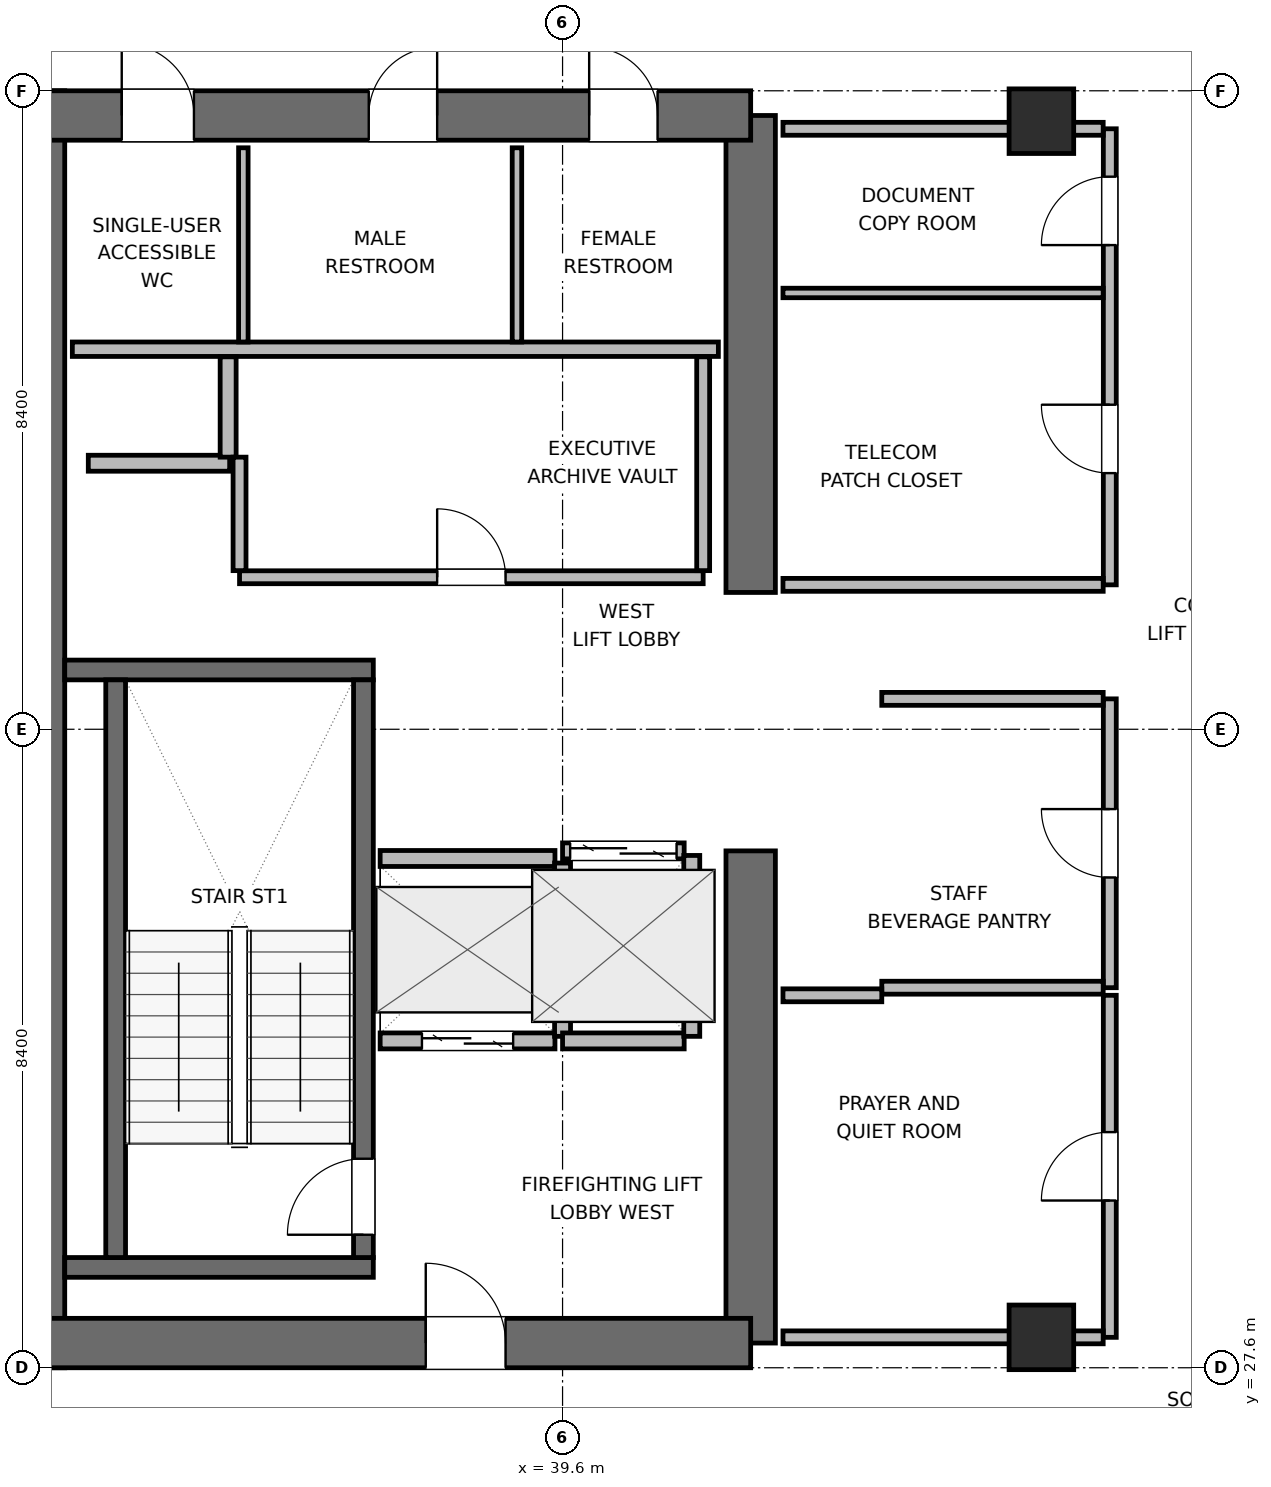
"""IFC4 building model, lengths in metres.
Left out: names, types, materials, properties, quantities, classifications, styles, units other than length and angle.
Written with IfcOpenShell. Run it as: python <this file> out.ifc"""

import sys

from ifc_helpers import new_model, si_unit, direction, frame, frame_2d, origin, origin_2d, place, context, subcontext, project, spatial, rectangle, extrude, element, fill, save


model = new_model("IFC4")
c1 = context("Model", 3, precision=1e-05, world=origin(), true_north=direction((0.0, 1.0)))
c2 = subcontext(c1, "Body", "Model", "MODEL_VIEW")
j1 = project(units=[si_unit("LENGTHUNIT", "METRE"), si_unit("PLANEANGLEUNIT", "RADIAN")], contexts=[c1])
p1 = place(None, origin())
s1 = spatial("IfcSite", under=j1, at=p1, CompositionType="ELEMENT")
p2 = place(p1, origin())
s2 = spatial("IfcBuilding", under=s1, at=p2, CompositionType="ELEMENT")
p3 = place(p2, frame((0.0, 0.0, 258.9)))
s3 = spatial("IfcBuildingStorey", under=s2, at=p3, CompositionType="ELEMENT", Elevation=258.9)
p4 = place(p3, frame((32.725, 27.6, 0.0), z_axis=(0.0, 0.0, 1.0), x_axis=(0.0, 1.0, 0.0)))
e1 = element("IfcWall", 1, at=p4, inside=s3, PredefinedType="SHEAR", context=c2, shape_type="SweptSolid", body=[
    extrude(rectangle(XDim=16.8, YDim=0.65, at=frame_2d((8.4, 0.0))), origin(), (0.0, 0.0, 1.0), 3.9),
])
p5 = place(p3, frame((42.075, 27.925, 0.0), z_axis=(0.0, 0.0, 1.0), x_axis=(0.0, 1.0, 0.0)))
e2 = element("IfcWall", 2, at=p5, inside=s3, PredefinedType="SHEAR", context=c2, shape_type="SweptSolid", body=[
    extrude(rectangle(XDim=6.475, YDim=0.65, at=frame_2d((3.237, 0.0))), origin(), (0.0, 0.0, 1.0), 3.9),
])
p6 = place(p3, frame((42.075, 37.8, 0.0), z_axis=(0.0, 0.0, 1.0), x_axis=(0.0, 1.0, 0.0)))
e3 = element("IfcWall", 3, at=p6, inside=s3, PredefinedType="SHEAR", context=c2, shape_type="SweptSolid", body=[
    extrude(rectangle(XDim=6.275, YDim=0.65, at=frame_2d((3.137, 0.0))), origin(), (0.0, 0.0, 1.0), 3.9),
])
p7 = place(p3, frame((32.725, 27.925, 0.0), z_axis=(0.0, 0.0, 1.0), x_axis=(1.0, 0.0, 0.0)))
e4 = element("IfcWall", 4, at=p7, inside=s3, PredefinedType="SHEAR", context=c2, shape_type="SweptSolid", body=[
    extrude(rectangle(XDim=9.35, YDim=0.65, at=frame_2d((4.675, 0.0))), origin(), (0.0, 0.0, 1.0), 3.9),
])
p8 = place(p7, frame((5.075, 0.0, 0.0)))
e5 = element("IfcOpeningElement", 5, at=p8, cuts=e4, PredefinedType="OPENING", context=c2, shape_type="SweptSolid", body=[
    extrude(rectangle(XDim=1.05, YDim=2.04, at=frame_2d((0.525, 1.02))), frame((0.0, 0.335, 0.0), z_axis=(0.0, -1.0, 0.0), x_axis=(1.0, 0.0, 0.0)), (0.0, 0.0, 1.0), 0.67),
])
p9 = place(p3, frame((32.725, 44.075, 0.0), z_axis=(0.0, 0.0, 1.0), x_axis=(1.0, 0.0, 0.0)))
e6 = element("IfcWall", 6, at=p9, inside=s3, PredefinedType="SHEAR", context=c2, shape_type="SweptSolid", body=[
    extrude(rectangle(XDim=9.35, YDim=0.65, at=frame_2d((4.675, 0.0))), origin(), (0.0, 0.0, 1.0), 3.9),
])
p10 = place(p9, frame((1.075, 0.0, 0.0)))
e7 = element("IfcOpeningElement", 7, at=p10, cuts=e6, PredefinedType="OPENING", context=c2, shape_type="SweptSolid", body=[
    extrude(rectangle(XDim=0.95, YDim=2.04, at=frame_2d((0.475, 1.02))), frame((0.0, 0.335, 0.0), z_axis=(0.0, -1.0, 0.0), x_axis=(1.0, 0.0, 0.0)), (0.0, 0.0, 1.0), 0.67),
])
p11 = place(p9, frame((4.325, 0.0, 0.0)))
e8 = element("IfcOpeningElement", 8, at=p11, cuts=e6, PredefinedType="OPENING", context=c2, shape_type="SweptSolid", body=[
    extrude(rectangle(XDim=0.9, YDim=2.02, at=frame_2d((0.45, 1.01))), frame((0.0, 0.335, 0.0), z_axis=(0.0, -1.0, 0.0), x_axis=(1.0, 0.0, 0.0)), (0.0, 0.0, 1.0), 0.67),
])
p12 = place(p9, frame((7.225, 0.0, 0.0)))
e9 = element("IfcOpeningElement", 9, at=p12, cuts=e6, PredefinedType="OPENING", context=c2, shape_type="SweptSolid", body=[
    extrude(rectangle(XDim=0.9, YDim=2.02, at=frame_2d((0.45, 1.01))), frame((0.0, 0.335, 0.0), z_axis=(0.0, -1.0, 0.0), x_axis=(1.0, 0.0, 0.0)), (0.0, 0.0, 1.0), 0.67),
])
for number, where, z_axis, x_axis in (
    (10, (33.05, 28.92, 0.0), (0.0, 0.0, 1.0), (1.0, 0.0, 0.0)),
    (11, (33.05, 36.78, 0.0), (0.0, 0.0, 1.0), (1.0, 0.0, 0.0)),
):
    element("IfcWall", number, at=place(p3, frame(where, z_axis=z_axis, x_axis=x_axis)), inside=s3, PredefinedType="SHEAR", context=c2, shape_type="SweptSolid", body=[
        extrude(rectangle(XDim=4.06, YDim=0.26, at=frame_2d((2.03, 0.0))), origin(), (0.0, 0.0, 1.0), 3.9),
    ])
p13 = place(p3, frame((33.72, 29.05, 0.0), z_axis=(0.0, 0.0, 1.0), x_axis=(0.0, 1.0, 0.0)))
e12 = element("IfcWall", 12, at=p13, inside=s3, PredefinedType="SHEAR", context=c2, shape_type="SweptSolid", body=[
    extrude(rectangle(XDim=7.6, YDim=0.26, at=frame_2d((3.8, 0.0))), origin(), (0.0, 0.0, 1.0), 3.9),
])
p14 = place(p3, frame((36.98, 29.05, 0.0), z_axis=(0.0, 0.0, 1.0), x_axis=(0.0, 1.0, 0.0)))
e13 = element("IfcWall", 13, at=p14, inside=s3, PredefinedType="SHEAR", context=c2, shape_type="SweptSolid", body=[
    extrude(rectangle(XDim=7.6, YDim=0.26, at=frame_2d((3.8, 0.0))), origin(), (0.0, 0.0, 1.0), 3.9),
])
p15 = place(p14, frame((0.3, 0.0, 0.0)))
e14 = element("IfcOpeningElement", 14, at=p15, cuts=e13, PredefinedType="OPENING", context=c2, shape_type="SweptSolid", body=[
    extrude(rectangle(XDim=1.0, YDim=2.04, at=frame_2d((0.5, 1.02))), frame((0.0, 0.14, 0.0), z_axis=(0.0, -1.0, 0.0), x_axis=(1.0, 0.0, 0.0)), (0.0, 0.0, 1.0), 0.28),
])
for number, where, z_axis, x_axis in (
    (15, (45.9, 28.0, 0.0), (0.0, 0.0, 1.0), (1.0, 0.0, 0.0)),
    (16, (45.9, 44.0, 0.0), (0.0, 0.0, 1.0), (1.0, 0.0, 0.0)),
):
    element("IfcColumn", number, at=place(p3, frame(where, z_axis=z_axis, x_axis=x_axis)), inside=s3, PredefinedType="COLUMN", context=c2, shape_type="SweptSolid", body=[
        extrude(rectangle(XDim=0.85, YDim=0.85, at=origin_2d()), origin(), (0.0, 0.0, 1.0), 3.9),
    ])
p16 = place(p3, frame((33.15, 41.0, 0.0), z_axis=(0.0, 0.0, 1.0), x_axis=(1.0, 0.0, 0.0)))
e17 = element("IfcWall", 17, at=p16, inside=s3, PredefinedType="PLUMBINGWALL", context=c2, shape_type="SweptSolid", body=[
    extrude(rectangle(XDim=8.5, YDim=0.19, at=frame_2d((4.25, 0.0))), origin(), (0.0, 0.0, 1.0), 3.68),
])
for number, where, z_axis, x_axis in (
    (18, (35.4, 41.095, 0.0), (0.0, 0.0, 1.0), (0.0, 1.0, 0.0)),
    (19, (39.0, 41.095, 0.0), (0.0, 0.0, 1.0), (0.0, 1.0, 0.0)),
):
    element("IfcWall", number, at=place(p3, frame(where, z_axis=z_axis, x_axis=x_axis)), inside=s3, PredefinedType="PARTITIONING", context=c2, shape_type="SweptSolid", body=[
        extrude(rectangle(XDim=2.555, YDim=0.125, at=frame_2d((1.277, 0.0))), origin(), (0.0, 0.0, 1.0), 3.68),
    ])
p17 = place(p3, frame((33.36, 39.5, 0.0), z_axis=(0.0, 0.0, 1.0), x_axis=(1.0, 0.0, 0.0)))
e20 = element("IfcWall", 20, at=p17, inside=s3, PredefinedType="PARTITIONING", context=c2, shape_type="SweptSolid", body=[
    extrude(rectangle(XDim=1.86, YDim=0.21, at=frame_2d((0.93, 0.0))), origin(), (0.0, 0.0, 1.0), 3.68),
])
p18 = place(p3, frame((35.2, 39.58, 0.0), z_axis=(0.0, 0.0, 1.0), x_axis=(0.0, 1.0, 0.0)))
e21 = element("IfcWall", 21, at=p18, inside=s3, PredefinedType="PARTITIONING", context=c2, shape_type="SweptSolid", body=[
    extrude(rectangle(XDim=1.32, YDim=0.21, at=frame_2d((0.66, 0.0))), origin(), (0.0, 0.0, 1.0), 3.68),
])
p19 = place(p3, frame((37.2, 31.9, 0.0), z_axis=(0.0, 0.0, 1.0), x_axis=(1.0, 0.0, 0.0)))
e22 = element("IfcWall", 22, at=p19, inside=s3, PredefinedType="PARTITIONING", context=c2, shape_type="SweptSolid", body=[
    extrude(rectangle(XDim=2.3, YDim=0.21, at=frame_2d((1.15, 0.0))), origin(), (0.0, 0.0, 1.0), 3.68),
])
p20 = place(p19, frame((0.55, 0.0, 0.0)))
e23 = element("IfcOpeningElement", 23, at=p20, cuts=e22, PredefinedType="OPENING", context=c2, shape_type="SweptSolid", body=[
    extrude(rectangle(XDim=1.2, YDim=2.04, at=frame_2d((0.6, 1.02))), frame((0.0, 0.115, 0.0), z_axis=(0.0, -1.0, 0.0), x_axis=(1.0, 0.0, 0.0)), (0.0, 0.0, 1.0), 0.23),
])
p21 = place(p3, frame((37.2, 34.3, 0.0), z_axis=(0.0, 0.0, 1.0), x_axis=(1.0, 0.0, 0.0)))
e24 = element("IfcWall", 24, at=p21, inside=s3, PredefinedType="PARTITIONING", context=c2, shape_type="SweptSolid", body=[
    extrude(rectangle(XDim=2.3, YDim=0.21, at=frame_2d((1.15, 0.0))), origin(), (0.0, 0.0, 1.0), 3.68),
])
p22 = place(p3, frame((39.6, 31.96, 0.0), z_axis=(0.0, 0.0, 1.0), x_axis=(0.0, 1.0, 0.0)))
e25 = element("IfcWall", 25, at=p22, inside=s3, PredefinedType="PARTITIONING", context=c2, shape_type="SweptSolid", body=[
    extrude(rectangle(XDim=2.28, YDim=0.21, at=frame_2d((1.14, 0.0))), origin(), (0.0, 0.0, 1.0), 3.68),
])
p23 = place(p3, frame((39.6, 34.4, 0.0), z_axis=(0.0, 0.0, 1.0), x_axis=(1.0, 0.0, 0.0)))
e26 = element("IfcWall", 26, at=p23, inside=s3, PredefinedType="PARTITIONING", context=c2, shape_type="SweptSolid", body=[
    extrude(rectangle(XDim=1.6, YDim=0.21, at=frame_2d((0.8, 0.0))), origin(), (0.0, 0.0, 1.0), 3.68),
])
p24 = place(p23, frame((0.1, 0.0, 0.0)))
e27 = element("IfcOpeningElement", 27, at=p24, cuts=e26, PredefinedType="OPENING", context=c2, shape_type="SweptSolid", body=[
    extrude(rectangle(XDim=1.4, YDim=2.06, at=frame_2d((0.7, 1.03))), frame((0.0, 0.115, 0.0), z_axis=(0.0, -1.0, 0.0), x_axis=(1.0, 0.0, 0.0)), (0.0, 0.0, 1.0), 0.23),
])
p25 = place(p3, frame((39.6, 31.9, 0.0), z_axis=(0.0, 0.0, 1.0), x_axis=(1.0, 0.0, 0.0)))
e28 = element("IfcWall", 28, at=p25, inside=s3, PredefinedType="PARTITIONING", context=c2, shape_type="SweptSolid", body=[
    extrude(rectangle(XDim=1.6, YDim=0.21, at=frame_2d((0.8, 0.0))), origin(), (0.0, 0.0, 1.0), 3.68),
])
p26 = place(p3, frame((41.3, 31.96, 0.0), z_axis=(0.0, 0.0, 1.0), x_axis=(0.0, 1.0, 0.0)))
e29 = element("IfcWall", 29, at=p26, inside=s3, PredefinedType="PARTITIONING", context=c2, shape_type="SweptSolid", body=[
    extrude(rectangle(XDim=2.38, YDim=0.21, at=frame_2d((1.19, 0.0))), origin(), (0.0, 0.0, 1.0), 3.68),
])
p27 = place(p3, frame((35.35, 38.0, 0.0), z_axis=(0.0, 0.0, 1.0), x_axis=(1.0, 0.0, 0.0)))
e30 = element("IfcWall", 30, at=p27, inside=s3, PredefinedType="PARTITIONING", context=c2, shape_type="SweptSolid", body=[
    extrude(rectangle(XDim=6.1, YDim=0.17, at=frame_2d((3.05, 0.0))), origin(), (0.0, 0.0, 1.0), 3.68),
])
p28 = place(p27, frame((2.6, 0.0, 0.0)))
e31 = element("IfcOpeningElement", 31, at=p28, cuts=e30, PredefinedType="OPENING", context=c2, shape_type="SweptSolid", body=[
    extrude(rectangle(XDim=0.9, YDim=2.02, at=frame_2d((0.45, 1.01))), frame((0.0, 0.095, 0.0), z_axis=(0.0, -1.0, 0.0), x_axis=(1.0, 0.0, 0.0)), (0.0, 0.0, 1.0), 0.19),
])
p29 = place(p3, frame((35.35, 38.087, 0.0), z_axis=(0.0, 0.0, 1.0), x_axis=(0.0, 1.0, 0.0)))
e32 = element("IfcWall", 32, at=p29, inside=s3, PredefinedType="PARTITIONING", context=c2, shape_type="SweptSolid", body=[
    extrude(rectangle(XDim=1.493, YDim=0.17, at=frame_2d((0.747, 0.0))), origin(), (0.0, 0.0, 1.0), 3.68),
])
p30 = place(p3, frame((41.45, 38.087, 0.0), z_axis=(0.0, 0.0, 1.0), x_axis=(0.0, 1.0, 0.0)))
e33 = element("IfcWall", 33, at=p30, inside=s3, PredefinedType="PARTITIONING", context=c2, shape_type="SweptSolid", body=[
    extrude(rectangle(XDim=2.813, YDim=0.17, at=frame_2d((1.406, 0.0))), origin(), (0.0, 0.0, 1.0), 3.68),
])
p31 = place(p3, frame((46.8, 32.6, 0.0), z_axis=(0.0, 0.0, 1.0), x_axis=(0.0, 1.0, 0.0)))
e34 = element("IfcWall", 34, at=p31, inside=s3, PredefinedType="PARTITIONING", context=c2, shape_type="SweptSolid", body=[
    extrude(rectangle(XDim=3.8, YDim=0.17, at=frame_2d((1.9, 0.0))), origin(), (0.0, 0.0, 1.0), 3.68),
])
p32 = place(p31, frame((1.45, 0.0, 0.0)))
e35 = element("IfcOpeningElement", 35, at=p32, cuts=e34, PredefinedType="OPENING", context=c2, shape_type="SweptSolid", body=[
    extrude(rectangle(XDim=0.9, YDim=2.02, at=frame_2d((0.45, 1.01))), frame((0.0, 0.095, 0.0), z_axis=(0.0, -1.0, 0.0), x_axis=(1.0, 0.0, 0.0)), (0.0, 0.0, 1.0), 0.19),
])
for number, where, z_axis, x_axis in (
    (36, (43.8, 32.6, 0.0), (0.0, 0.0, 1.0), (1.0, 0.0, 0.0)),
    (37, (43.8, 36.4, 0.0), (0.0, 0.0, 1.0), (1.0, 0.0, 0.0)),
):
    element("IfcWall", number, at=place(p3, frame(where, z_axis=z_axis, x_axis=x_axis)), inside=s3, PredefinedType="PARTITIONING", context=c2, shape_type="SweptSolid", body=[
        extrude(rectangle(XDim=2.913, YDim=0.17, at=frame_2d((1.457, 0.0))), origin(), (0.0, 0.0, 1.0), 3.68),
    ])
p33 = place(p3, frame((46.8, 28.0, 0.0), z_axis=(0.0, 0.0, 1.0), x_axis=(0.0, 1.0, 0.0)))
e38 = element("IfcWall", 38, at=p33, inside=s3, PredefinedType="PARTITIONING", context=c2, shape_type="SweptSolid", body=[
    extrude(rectangle(XDim=4.5, YDim=0.17, at=frame_2d((2.25, 0.0))), origin(), (0.0, 0.0, 1.0), 3.68),
])
p34 = place(p33, frame((1.8, 0.0, 0.0)))
e39 = element("IfcOpeningElement", 39, at=p34, cuts=e38, PredefinedType="OPENING", context=c2, shape_type="SweptSolid", body=[
    extrude(rectangle(XDim=0.9, YDim=2.02, at=frame_2d((0.45, 1.01))), frame((0.0, 0.095, 0.0), z_axis=(0.0, -1.0, 0.0), x_axis=(1.0, 0.0, 0.0)), (0.0, 0.0, 1.0), 0.19),
])
p35 = place(p3, frame((42.5, 28.0, 0.0), z_axis=(0.0, 0.0, 1.0), x_axis=(1.0, 0.0, 0.0)))
e40 = element("IfcWall", 40, at=p35, inside=s3, PredefinedType="PARTITIONING", context=c2, shape_type="SweptSolid", body=[
    extrude(rectangle(XDim=4.213, YDim=0.17, at=frame_2d((2.106, 0.0))), origin(), (0.0, 0.0, 1.0), 2.765),
])
p36 = place(p3, frame((42.5, 32.5, 0.0), z_axis=(0.0, 0.0, 1.0), x_axis=(1.0, 0.0, 0.0)))
e41 = element("IfcWall", 41, at=p36, inside=s3, PredefinedType="PARTITIONING", context=c2, shape_type="SweptSolid", body=[
    extrude(rectangle(XDim=1.3, YDim=0.17, at=frame_2d((0.65, 0.0))), origin(), (0.0, 0.0, 1.0), 3.68),
])
p37 = place(p3, frame((46.8, 37.9, 0.0), z_axis=(0.0, 0.0, 1.0), x_axis=(0.0, 1.0, 0.0)))
e42 = element("IfcWall", 42, at=p37, inside=s3, PredefinedType="PARTITIONING", context=c2, shape_type="SweptSolid", body=[
    extrude(rectangle(XDim=6.0, YDim=0.17, at=frame_2d((3.0, 0.0))), origin(), (0.0, 0.0, 1.0), 3.68),
])
p38 = place(p37, frame((1.47, 0.0, 0.0)))
e43 = element("IfcOpeningElement", 43, at=p38, cuts=e42, PredefinedType="OPENING", context=c2, shape_type="SweptSolid", body=[
    extrude(rectangle(XDim=0.9, YDim=2.02, at=frame_2d((0.45, 1.01))), frame((0.0, 0.095, 0.0), z_axis=(0.0, -1.0, 0.0), x_axis=(1.0, 0.0, 0.0)), (0.0, 0.0, 1.0), 0.19),
])
p39 = place(p37, frame((4.47, 0.0, 0.0)))
e44 = element("IfcOpeningElement", 44, at=p39, cuts=e42, PredefinedType="OPENING", context=c2, shape_type="SweptSolid", body=[
    extrude(rectangle(XDim=0.9, YDim=2.02, at=frame_2d((0.45, 1.01))), frame((0.0, 0.095, 0.0), z_axis=(0.0, -1.0, 0.0), x_axis=(1.0, 0.0, 0.0)), (0.0, 0.0, 1.0), 0.19),
])
p40 = place(p3, frame((42.5, 37.9, 0.0), z_axis=(0.0, 0.0, 1.0), x_axis=(1.0, 0.0, 0.0)))
e45 = element("IfcWall", 45, at=p40, inside=s3, PredefinedType="PARTITIONING", context=c2, shape_type="SweptSolid", body=[
    extrude(rectangle(XDim=4.213, YDim=0.17, at=frame_2d((2.106, 0.0))), origin(), (0.0, 0.0, 1.0), 3.68),
])
p41 = place(p3, frame((42.5, 43.9, 0.0), z_axis=(0.0, 0.0, 1.0), x_axis=(1.0, 0.0, 0.0)))
e46 = element("IfcWall", 46, at=p41, inside=s3, PredefinedType="PARTITIONING", context=c2, shape_type="SweptSolid", body=[
    extrude(rectangle(XDim=4.213, YDim=0.17, at=frame_2d((2.106, 0.0))), origin(), (0.0, 0.0, 1.0), 2.765),
])
p42 = place(p3, frame((42.5, 41.74, 0.0), z_axis=(0.0, 0.0, 1.0), x_axis=(1.0, 0.0, 0.0)))
e47 = element("IfcWall", 47, at=p42, inside=s3, PredefinedType="PARTITIONING", context=c2, shape_type="SweptSolid", body=[
    extrude(rectangle(XDim=4.213, YDim=0.125, at=frame_2d((2.106, 0.0))), origin(), (0.0, 0.0, 1.0), 3.68),
])
p43 = place(p15, origin())
e48 = element("IfcDoor", 48, at=p43, inside=s3, OperationType="SINGLE_SWING_LEFT", PredefinedType="DOOR", context=c2, shape_type="SweptSolid", body=[
    extrude(rectangle(XDim=1.0, YDim=2.04, at=frame_2d((0.5, 1.02))), frame((0.0, 0.025, 0.0), z_axis=(0.0, -1.0, 0.0), x_axis=(1.0, 0.0, 0.0)), (0.0, 0.0, 1.0), 0.05),
])
fill(e14, e48)
p44 = place(p20, origin())
e49 = element("IfcDoor", 49, at=p44, inside=s3, OperationType="DOUBLE_DOOR_SLIDING", PredefinedType="DOOR", context=c2, shape_type="SweptSolid", body=[
    extrude(rectangle(XDim=1.2, YDim=2.04, at=frame_2d((0.6, 1.02))), frame((0.0, 0.025, 0.0), z_axis=(0.0, -1.0, 0.0), x_axis=(1.0, 0.0, 0.0)), (0.0, 0.0, 1.0), 0.05),
])
fill(e23, e49)
p45 = place(p24, origin())
e50 = element("IfcDoor", 50, at=p45, inside=s3, OperationType="DOUBLE_DOOR_SLIDING", PredefinedType="DOOR", context=c2, shape_type="SweptSolid", body=[
    extrude(rectangle(XDim=1.4, YDim=2.06, at=frame_2d((0.7, 1.03))), frame((0.0, 0.025, 0.0), z_axis=(0.0, -1.0, 0.0), x_axis=(1.0, 0.0, 0.0)), (0.0, 0.0, 1.0), 0.05),
])
fill(e27, e50)
p46 = place(p8, origin())
e51 = element("IfcDoor", 51, at=p46, inside=s3, OperationType="SINGLE_SWING_LEFT", PredefinedType="DOOR", context=c2, shape_type="SweptSolid", body=[
    extrude(rectangle(XDim=1.05, YDim=2.04, at=frame_2d((0.525, 1.02))), frame((0.0, 0.025, 0.0), z_axis=(0.0, -1.0, 0.0), x_axis=(1.0, 0.0, 0.0)), (0.0, 0.0, 1.0), 0.05),
])
fill(e5, e51)
p47 = place(p10, origin())
e52 = element("IfcDoor", 52, at=p47, inside=s3, OperationType="SINGLE_SWING_LEFT", PredefinedType="DOOR", context=c2, shape_type="SweptSolid", body=[
    extrude(rectangle(XDim=0.95, YDim=2.04, at=frame_2d((0.475, 1.02))), frame((0.0, 0.025, 0.0), z_axis=(0.0, -1.0, 0.0), x_axis=(1.0, 0.0, 0.0)), (0.0, 0.0, 1.0), 0.05),
])
fill(e7, e52)
p48 = place(p11, origin())
e53 = element("IfcDoor", 53, at=p48, inside=s3, OperationType="SINGLE_SWING_RIGHT", PredefinedType="DOOR", context=c2, shape_type="SweptSolid", body=[
    extrude(rectangle(XDim=0.9, YDim=2.02, at=frame_2d((0.45, 1.01))), frame((0.0, 0.025, 0.0), z_axis=(0.0, -1.0, 0.0), x_axis=(1.0, 0.0, 0.0)), (0.0, 0.0, 1.0), 0.05),
])
fill(e8, e53)
p49 = place(p12, origin())
e54 = element("IfcDoor", 54, at=p49, inside=s3, OperationType="SINGLE_SWING_LEFT", PredefinedType="DOOR", context=c2, shape_type="SweptSolid", body=[
    extrude(rectangle(XDim=0.9, YDim=2.02, at=frame_2d((0.45, 1.01))), frame((0.0, 0.025, 0.0), z_axis=(0.0, -1.0, 0.0), x_axis=(1.0, 0.0, 0.0)), (0.0, 0.0, 1.0), 0.05),
])
fill(e9, e54)
p50 = place(p28, origin())
e55 = element("IfcDoor", 55, at=p50, inside=s3, OperationType="SINGLE_SWING_LEFT", PredefinedType="DOOR", context=c2, shape_type="SweptSolid", body=[
    extrude(rectangle(XDim=0.9, YDim=2.02, at=frame_2d((0.45, 1.01))), frame((0.0, 0.025, 0.0), z_axis=(0.0, -1.0, 0.0), x_axis=(1.0, 0.0, 0.0)), (0.0, 0.0, 1.0), 0.05),
])
fill(e31, e55)
p51 = place(p32, origin())
e56 = element("IfcDoor", 56, at=p51, inside=s3, OperationType="SINGLE_SWING_RIGHT", PredefinedType="DOOR", context=c2, shape_type="SweptSolid", body=[
    extrude(rectangle(XDim=0.9, YDim=2.02, at=frame_2d((0.45, 1.01))), frame((0.0, 0.025, 0.0), z_axis=(0.0, -1.0, 0.0), x_axis=(1.0, 0.0, 0.0)), (0.0, 0.0, 1.0), 0.05),
])
fill(e35, e56)
p52 = place(p34, origin())
e57 = element("IfcDoor", 57, at=p52, inside=s3, OperationType="SINGLE_SWING_LEFT", PredefinedType="DOOR", context=c2, shape_type="SweptSolid", body=[
    extrude(rectangle(XDim=0.9, YDim=2.02, at=frame_2d((0.45, 1.01))), frame((0.0, 0.025, 0.0), z_axis=(0.0, -1.0, 0.0), x_axis=(1.0, 0.0, 0.0)), (0.0, 0.0, 1.0), 0.05),
])
fill(e39, e57)
p53 = place(p38, origin())
e58 = element("IfcDoor", 58, at=p53, inside=s3, OperationType="SINGLE_SWING_RIGHT", PredefinedType="DOOR", context=c2, shape_type="SweptSolid", body=[
    extrude(rectangle(XDim=0.9, YDim=2.02, at=frame_2d((0.45, 1.01))), frame((0.0, 0.025, 0.0), z_axis=(0.0, -1.0, 0.0), x_axis=(1.0, 0.0, 0.0)), (0.0, 0.0, 1.0), 0.05),
])
fill(e43, e58)
p54 = place(p39, origin())
e59 = element("IfcDoor", 59, at=p54, inside=s3, OperationType="SINGLE_SWING_LEFT", PredefinedType="DOOR", context=c2, shape_type="SweptSolid", body=[
    extrude(rectangle(XDim=0.9, YDim=2.02, at=frame_2d((0.45, 1.01))), frame((0.0, 0.025, 0.0), z_axis=(0.0, -1.0, 0.0), x_axis=(1.0, 0.0, 0.0)), (0.0, 0.0, 1.0), 0.05),
])
fill(e44, e59)
save(model, sys.argv[1])
